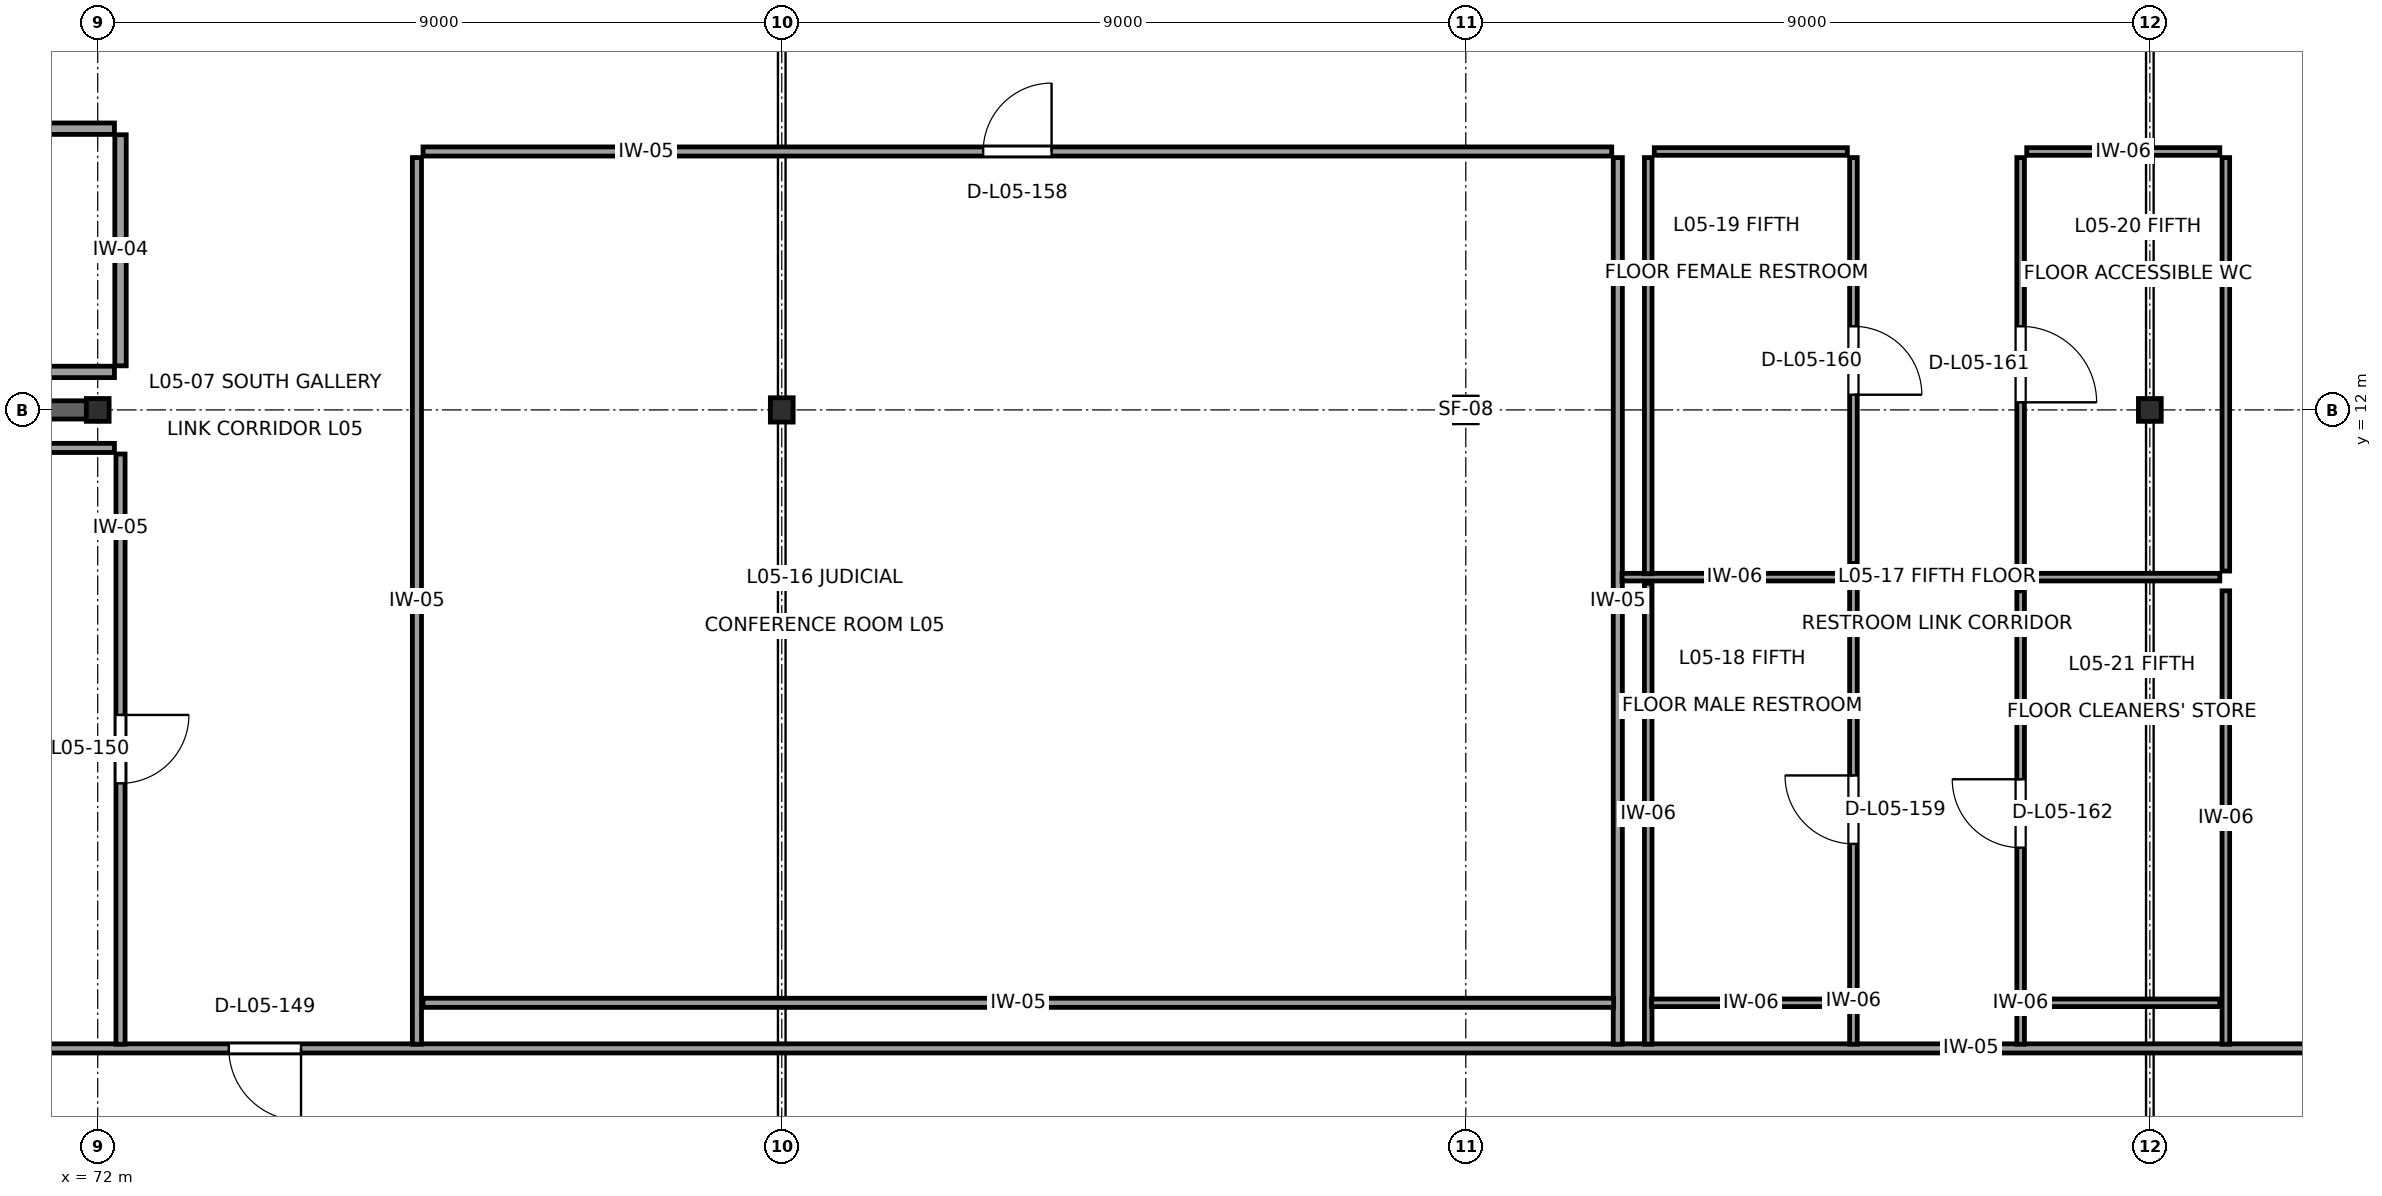
"""IFC4 building model, lengths in metres.
Left out: names, types, materials, properties, quantities, classifications, styles, units other than length and angle.
Written with IfcOpenShell. Run it as: python <this file> out.ifc"""

import sys

from ifc_helpers import new_model, si_unit, direction, frame, frame_2d, origin, origin_2d, place, context, subcontext, project, spatial, rectangle, i_section, extrude, element, fill, save


model = new_model("IFC4")
c1 = context("Model", 3, precision=1e-05, world=origin(), true_north=direction((0.0, 1.0)))
c2 = subcontext(c1, "Body", "Model", "MODEL_VIEW")
j1 = project(units=[si_unit("LENGTHUNIT", "METRE"), si_unit("PLANEANGLEUNIT", "RADIAN")], contexts=[c1])
p1 = place(None, origin())
s1 = spatial("IfcSite", under=j1, at=p1, CompositionType="ELEMENT")
p2 = place(p1, origin())
s2 = spatial("IfcBuilding", under=s1, at=p2, CompositionType="ELEMENT")
p3 = place(p2, frame((0.0, 0.0, 23.4)))
s3 = spatial("IfcBuildingStorey", under=s2, at=p3, CompositionType="ELEMENT", Elevation=23.4)
p4 = place(p3, frame((72.0, 12.0, 0.0), z_axis=(0.0, 0.0, 1.0), x_axis=(0.0, 1.0, 0.0)))
e1 = element("IfcColumn", 1, at=p4, inside=s3, PredefinedType="COLUMN", context=c2, shape_type="SweptSolid", body=[
    extrude(i_section(OverallWidth=0.3, OverallDepth=0.3, WebThickness=0.011, FlangeThickness=0.019, at=origin_2d()), origin(), (0.0, 0.0, 1.0), 4.0),
])
p5 = place(p3, frame((81.0, 12.0, 0.0), z_axis=(0.0, 0.0, 1.0), x_axis=(1.0, 0.0, 0.0)))
e2 = element("IfcColumn", 2, at=p5, inside=s3, PredefinedType="COLUMN", context=c2, shape_type="SweptSolid", body=[
    extrude(i_section(OverallWidth=0.3, OverallDepth=0.32, WebThickness=0.011, FlangeThickness=0.021, at=origin_2d()), origin(), (0.0, 0.0, 1.0), 4.0),
])
p6 = place(p3, frame((90.0, 12.0, 0.0), z_axis=(0.0, 0.0, 1.0), x_axis=(1.0, 0.0, 0.0)))
e3 = element("IfcColumn", 3, at=p6, inside=s3, PredefinedType="COLUMN", context=c2, shape_type="SweptSolid", body=[
    extrude(i_section(OverallWidth=0.3, OverallDepth=0.34, WebThickness=0.012, FlangeThickness=0.021, at=origin_2d()), origin(), (0.0, 0.0, 1.0), 4.0),
])
p7 = place(p3, frame((99.0, 12.0, 0.0), z_axis=(0.0, 0.0, 1.0), x_axis=(1.0, 0.0, 0.0)))
e4 = element("IfcColumn", 4, at=p7, inside=s3, PredefinedType="COLUMN", context=c2, shape_type="SweptSolid", body=[
    extrude(i_section(OverallWidth=0.3, OverallDepth=0.3, WebThickness=0.011, FlangeThickness=0.019, at=origin_2d()), origin(), (0.0, 0.0, 1.0), 4.0),
])
p8 = place(p3, frame((63.008, 12.0, 0.0), z_axis=(0.0, 0.0, 1.0), x_axis=(1.0, 0.0, 0.0)))
e5 = element("IfcWall", 5, at=p8, inside=s3, PredefinedType="SHEAR", context=c2, shape_type="SweptSolid", body=[
    extrude(rectangle(XDim=8.844, YDim=0.24, at=frame_2d((4.422, 0.0))), origin(), (0.0, 0.0, 1.0), 2.845),
])
p9 = place(p3, frame((53.87, 3.6, 0.0), z_axis=(0.0, 0.0, 1.0), x_axis=(1.0, 0.0, 0.0)))
e6 = element("IfcWall", 6, at=p9, inside=s3, PredefinedType="PARTITIONING", context=c2, shape_type="SweptSolid", body=[
    extrude(rectangle(XDim=63.25, YDim=0.12, at=frame_2d((31.625, 0.0))), origin(), (0.0, 0.0, 1.0), 3.64),
])
p10 = place(p9, frame((19.855, 0.0, 0.0)))
e7 = element("IfcOpeningElement", 7, at=p10, cuts=e6, PredefinedType="OPENING", context=c2, shape_type="SweptSolid", body=[
    extrude(rectangle(XDim=0.95, YDim=2.15, at=frame_2d((0.475, 1.075))), frame((0.0, 0.075, 0.0), z_axis=(0.0, -1.0, 0.0), x_axis=(1.0, 0.0, 0.0)), (0.0, 0.0, 1.0), 0.15),
])
p11 = place(p3, frame((72.3, 11.42, 0.0), z_axis=(0.0, 0.0, 1.0), x_axis=(0.0, -1.0, 0.0)))
e8 = element("IfcWall", 8, at=p11, inside=s3, PredefinedType="PARTITIONING", context=c2, shape_type="SweptSolid", body=[
    extrude(rectangle(XDim=7.765, YDim=0.12, at=frame_2d((3.882, 0.0))), origin(), (0.0, 0.0, 1.0), 3.64),
])
p12 = place(p11, frame((3.433, 0.0, 0.0)))
e9 = element("IfcOpeningElement", 9, at=p12, cuts=e8, PredefinedType="OPENING", context=c2, shape_type="SweptSolid", body=[
    extrude(rectangle(XDim=0.9, YDim=2.1, at=frame_2d((0.45, 1.05))), frame((0.0, 0.075, 0.0), z_axis=(0.0, -1.0, 0.0), x_axis=(1.0, 0.0, 0.0)), (0.0, 0.0, 1.0), 0.15),
])
p13 = place(p3, frame((62.795, 11.5, 0.0), z_axis=(0.0, 0.0, 1.0), x_axis=(1.0, 0.0, 0.0)))
e10 = element("IfcWall", 10, at=p13, inside=s3, PredefinedType="PARTITIONING", context=c2, shape_type="SweptSolid", body=[
    extrude(rectangle(XDim=9.425, YDim=0.12, at=frame_2d((4.712, 0.0))), origin(), (0.0, 0.0, 1.0), 3.64),
])
p14 = place(p3, frame((72.22, 12.5, 0.0), z_axis=(0.0, 0.0, 1.0), x_axis=(-1.0, 0.0, 0.0)))
e11 = element("IfcWall", 11, at=p14, inside=s3, PredefinedType="PARTITIONING", context=c2, shape_type="SweptSolid", body=[
    extrude(rectangle(XDim=9.425, YDim=0.15, at=frame_2d((4.712, 0.0))), origin(), (0.0, 0.0, 1.0), 3.64),
])
p15 = place(p3, frame((62.795, 15.7, 0.0), z_axis=(0.0, 0.0, 1.0), x_axis=(1.0, 0.0, 0.0)))
e12 = element("IfcWall", 12, at=p15, inside=s3, PredefinedType="PARTITIONING", context=c2, shape_type="SweptSolid", body=[
    extrude(rectangle(XDim=9.425, YDim=0.15, at=frame_2d((4.712, 0.0))), origin(), (0.0, 0.0, 1.0), 3.64),
])
p16 = place(p15, frame((4.187, 0.0, 0.0)))
e13 = element("IfcOpeningElement", 13, at=p16, cuts=e12, PredefinedType="OPENING", context=c2, shape_type="SweptSolid", body=[
    extrude(rectangle(XDim=1.05, YDim=2.25, at=frame_2d((0.525, 1.125))), frame((0.0, 0.09, 0.0), z_axis=(0.0, -1.0, 0.0), x_axis=(1.0, 0.0, 0.0)), (0.0, 0.0, 1.0), 0.18),
])
p17 = place(p3, frame((72.3, 15.62, 0.0), z_axis=(0.0, 0.0, 1.0), x_axis=(0.0, -1.0, 0.0)))
e14 = element("IfcWall", 14, at=p17, inside=s3, PredefinedType="PARTITIONING", context=c2, shape_type="SweptSolid", body=[
    extrude(rectangle(XDim=3.04, YDim=0.15, at=frame_2d((1.52, 0.0))), origin(), (0.0, 0.0, 1.0), 3.64),
])
p18 = place(p3, frame((92.0, 15.32, 0.0), z_axis=(0.0, 0.0, 1.0), x_axis=(0.0, -1.0, 0.0)))
e15 = element("IfcWall", 15, at=p18, inside=s3, PredefinedType="PARTITIONING", context=c2, shape_type="SweptSolid", body=[
    extrude(rectangle(XDim=11.665, YDim=0.12, at=frame_2d((5.833, 0.0))), origin(), (0.0, 0.0, 1.0), 3.64),
])
p19 = place(p3, frame((91.945, 4.2, 0.0), z_axis=(0.0, 0.0, 1.0), x_axis=(-1.0, 0.0, 0.0)))
e16 = element("IfcWall", 16, at=p19, inside=s3, PredefinedType="PARTITIONING", context=c2, shape_type="SweptSolid", body=[
    extrude(rectangle(XDim=15.665, YDim=0.12, at=frame_2d((7.833, 0.0))), origin(), (0.0, 0.0, 1.0), 3.64),
])
p20 = place(p3, frame((76.2, 3.655, 0.0), z_axis=(0.0, 0.0, 1.0), x_axis=(0.0, 1.0, 0.0)))
e17 = element("IfcWall", 17, at=p20, inside=s3, PredefinedType="PARTITIONING", context=c2, shape_type="SweptSolid", body=[
    extrude(rectangle(XDim=11.665, YDim=0.12, at=frame_2d((5.833, 0.0))), origin(), (0.0, 0.0, 1.0), 3.64),
])
p21 = place(p3, frame((76.28, 15.4, 0.0), z_axis=(0.0, 0.0, 1.0), x_axis=(1.0, 0.0, 0.0)))
e18 = element("IfcWall", 18, at=p21, inside=s3, PredefinedType="PARTITIONING", context=c2, shape_type="SweptSolid", body=[
    extrude(rectangle(XDim=15.64, YDim=0.12, at=frame_2d((7.82, 0.0))), origin(), (0.0, 0.0, 1.0), 3.64),
])
p22 = place(p21, frame((7.37, 0.0, 0.0)))
e19 = element("IfcOpeningElement", 19, at=p22, cuts=e18, PredefinedType="OPENING", context=c2, shape_type="SweptSolid", body=[
    extrude(rectangle(XDim=0.9, YDim=2.1, at=frame_2d((0.45, 1.05))), frame((0.0, 0.075, 0.0), z_axis=(0.0, -1.0, 0.0), x_axis=(1.0, 0.0, 0.0)), (0.0, 0.0, 1.0), 0.15),
])
p23 = place(p3, frame((92.4, 3.655, 0.0), z_axis=(0.0, 0.0, 1.0), x_axis=(0.0, 1.0, 0.0)))
e20 = element("IfcWall", 20, at=p23, inside=s3, PredefinedType="PARTITIONING", context=c2, shape_type="SweptSolid", body=[
    extrude(rectangle(XDim=6.065, YDim=0.1, at=frame_2d((3.032, 0.0))), origin(), (0.0, 0.0, 1.0), 3.64),
])
p24 = place(p3, frame((92.055, 9.8, 0.0), z_axis=(0.0, 0.0, 1.0), x_axis=(1.0, 0.0, 0.0)))
e21 = element("IfcWall", 21, at=p24, inside=s3, PredefinedType="PARTITIONING", context=c2, shape_type="SweptSolid", body=[
    extrude(rectangle(XDim=2.965, YDim=0.1, at=frame_2d((1.482, 0.0))), origin(), (0.0, 0.0, 1.0), 3.64),
])
p25 = place(p3, frame((95.1, 9.72, 0.0), z_axis=(0.0, 0.0, 1.0), x_axis=(0.0, -1.0, 0.0)))
e22 = element("IfcWall", 22, at=p25, inside=s3, PredefinedType="PARTITIONING", context=c2, shape_type="SweptSolid", body=[
    extrude(rectangle(XDim=6.065, YDim=0.1, at=frame_2d((3.032, 0.0))), origin(), (0.0, 0.0, 1.0), 3.64),
])
p26 = place(p25, frame((2.529, 0.0, 0.0)))
e23 = element("IfcOpeningElement", 23, at=p26, cuts=e22, PredefinedType="OPENING", context=c2, shape_type="SweptSolid", body=[
    extrude(rectangle(XDim=0.9, YDim=2.05, at=frame_2d((0.45, 1.025))), frame((0.0, 0.065, 0.0), z_axis=(0.0, -1.0, 0.0), x_axis=(1.0, 0.0, 0.0)), (0.0, 0.0, 1.0), 0.13),
])
p27 = place(p3, frame((95.055, 4.2, 0.0), z_axis=(0.0, 0.0, 1.0), x_axis=(-1.0, 0.0, 0.0)))
e24 = element("IfcWall", 24, at=p27, inside=s3, PredefinedType="PARTITIONING", context=c2, shape_type="SweptSolid", body=[
    extrude(rectangle(XDim=2.61, YDim=0.1, at=frame_2d((1.305, 0.0))), origin(), (0.0, 0.0, 1.0), 3.64),
])
p28 = place(p3, frame((92.48, 15.4, 0.0), z_axis=(0.0, 0.0, 1.0), x_axis=(1.0, 0.0, 0.0)))
e25 = element("IfcWall", 25, at=p28, inside=s3, PredefinedType="PARTITIONING", context=c2, shape_type="SweptSolid", body=[
    extrude(rectangle(XDim=2.54, YDim=0.1, at=frame_2d((1.27, 0.0))), origin(), (0.0, 0.0, 1.0), 3.64),
])
p29 = place(p3, frame((95.1, 15.32, 0.0), z_axis=(0.0, 0.0, 1.0), x_axis=(0.0, -1.0, 0.0)))
e26 = element("IfcWall", 26, at=p29, inside=s3, PredefinedType="PARTITIONING", context=c2, shape_type="SweptSolid", body=[
    extrude(rectangle(XDim=5.34, YDim=0.1, at=frame_2d((2.67, 0.0))), origin(), (0.0, 0.0, 1.0), 3.64),
])
p30 = place(p29, frame((2.22, 0.0, 0.0)))
e27 = element("IfcOpeningElement", 27, at=p30, cuts=e26, PredefinedType="OPENING", context=c2, shape_type="SweptSolid", body=[
    extrude(rectangle(XDim=0.9, YDim=2.05, at=frame_2d((0.45, 1.025))), frame((0.0, 0.065, 0.0), z_axis=(0.0, -1.0, 0.0), x_axis=(1.0, 0.0, 0.0)), (0.0, 0.0, 1.0), 0.13),
])
p31 = place(p3, frame((92.4, 9.845, 0.0), z_axis=(0.0, 0.0, 1.0), x_axis=(0.0, 1.0, 0.0)))
e28 = element("IfcWall", 28, at=p31, inside=s3, PredefinedType="PARTITIONING", context=c2, shape_type="SweptSolid", body=[
    extrude(rectangle(XDim=5.475, YDim=0.1, at=frame_2d((2.738, 0.0))), origin(), (0.0, 0.0, 1.0), 3.64),
])
p32 = place(p3, frame((100.0, 15.32, 0.0), z_axis=(0.0, 0.0, 1.0), x_axis=(0.0, -1.0, 0.0)))
e29 = element("IfcWall", 29, at=p32, inside=s3, PredefinedType="PARTITIONING", context=c2, shape_type="SweptSolid", body=[
    extrude(rectangle(XDim=5.44, YDim=0.1, at=frame_2d((2.72, 0.0))), origin(), (0.0, 0.0, 1.0), 3.64),
])
p33 = place(p3, frame((99.92, 9.8, 0.0), z_axis=(0.0, 0.0, 1.0), x_axis=(-1.0, 0.0, 0.0)))
e30 = element("IfcWall", 30, at=p33, inside=s3, PredefinedType="PARTITIONING", context=c2, shape_type="SweptSolid", body=[
    extrude(rectangle(XDim=2.54, YDim=0.1, at=frame_2d((1.27, 0.0))), origin(), (0.0, 0.0, 1.0), 3.64),
])
p34 = place(p3, frame((97.3, 9.88, 0.0), z_axis=(0.0, 0.0, 1.0), x_axis=(0.0, 1.0, 0.0)))
e31 = element("IfcWall", 31, at=p34, inside=s3, PredefinedType="PARTITIONING", context=c2, shape_type="SweptSolid", body=[
    extrude(rectangle(XDim=5.44, YDim=0.1, at=frame_2d((2.72, 0.0))), origin(), (0.0, 0.0, 1.0), 3.64),
])
p35 = place(p34, frame((2.22, 0.0, 0.0)))
e32 = element("IfcOpeningElement", 32, at=p35, cuts=e31, PredefinedType="OPENING", context=c2, shape_type="SweptSolid", body=[
    extrude(rectangle(XDim=1.0, YDim=2.1, at=frame_2d((0.5, 1.05))), frame((0.0, 0.065, 0.0), z_axis=(0.0, -1.0, 0.0), x_axis=(1.0, 0.0, 0.0)), (0.0, 0.0, 1.0), 0.13),
])
for number, where, z_axis, x_axis in (
    (33, (97.38, 15.4, 0.0), (0.0, 0.0, 1.0), (1.0, 0.0, 0.0)),
    (34, (99.92, 4.2, 0.0), (0.0, 0.0, 1.0), (-1.0, 0.0, 0.0)),
):
    element("IfcWall", number, at=place(p3, frame(where, z_axis=z_axis, x_axis=x_axis)), inside=s3, PredefinedType="PARTITIONING", context=c2, shape_type="SweptSolid", body=[
        extrude(rectangle(XDim=2.54, YDim=0.1, at=frame_2d((1.27, 0.0))), origin(), (0.0, 0.0, 1.0), 3.64),
    ])
p36 = place(p3, frame((97.3, 3.655, 0.0), z_axis=(0.0, 0.0, 1.0), x_axis=(0.0, 1.0, 0.0)))
e35 = element("IfcWall", 35, at=p36, inside=s3, PredefinedType="PARTITIONING", context=c2, shape_type="SweptSolid", body=[
    extrude(rectangle(XDim=5.965, YDim=0.1, at=frame_2d((2.982, 0.0))), origin(), (0.0, 0.0, 1.0), 3.64),
])
p37 = place(p36, frame((2.586, 0.0, 0.0)))
e36 = element("IfcOpeningElement", 36, at=p37, cuts=e35, PredefinedType="OPENING", context=c2, shape_type="SweptSolid", body=[
    extrude(rectangle(XDim=0.9, YDim=2.05, at=frame_2d((0.45, 1.025))), frame((0.0, 0.065, 0.0), z_axis=(0.0, -1.0, 0.0), x_axis=(1.0, 0.0, 0.0)), (0.0, 0.0, 1.0), 0.13),
])
p38 = place(p3, frame((100.0, 9.62, 0.0), z_axis=(0.0, 0.0, 1.0), x_axis=(0.0, -1.0, 0.0)))
e37 = element("IfcWall", 37, at=p38, inside=s3, PredefinedType="PARTITIONING", context=c2, shape_type="SweptSolid", body=[
    extrude(rectangle(XDim=5.965, YDim=0.1, at=frame_2d((2.982, 0.0))), origin(), (0.0, 0.0, 1.0), 3.64),
])
p39 = place(p10, frame((0.95, 0.0, 0.0), z_axis=(0.0, 0.0, 1.0), x_axis=(-1.0, 0.0, 0.0)))
e38 = element("IfcDoor", 38, at=p39, inside=s3, OperationType="SINGLE_SWING_RIGHT", PredefinedType="DOOR", context=c2, shape_type="SweptSolid", body=[
    extrude(rectangle(XDim=0.95, YDim=2.15, at=frame_2d((0.475, 1.075))), frame((0.0, 0.025, 0.0), z_axis=(0.0, -1.0, 0.0), x_axis=(1.0, 0.0, 0.0)), (0.0, 0.0, 1.0), 0.05),
])
fill(e7, e38)
p40 = place(p12, origin())
e39 = element("IfcDoor", 39, at=p40, inside=s3, OperationType="SINGLE_SWING_LEFT", PredefinedType="DOOR", context=c2, shape_type="SweptSolid", body=[
    extrude(rectangle(XDim=0.9, YDim=2.1, at=frame_2d((0.45, 1.05))), frame((0.0, 0.025, 0.0), z_axis=(0.0, -1.0, 0.0), x_axis=(1.0, 0.0, 0.0)), (0.0, 0.0, 1.0), 0.05),
])
fill(e9, e39)
p41 = place(p22, origin())
e40 = element("IfcDoor", 40, at=p41, inside=s3, OperationType="SINGLE_SWING_RIGHT", PredefinedType="DOOR", context=c2, shape_type="SweptSolid", body=[
    extrude(rectangle(XDim=0.9, YDim=2.1, at=frame_2d((0.45, 1.05))), frame((0.0, 0.025, 0.0), z_axis=(0.0, -1.0, 0.0), x_axis=(1.0, 0.0, 0.0)), (0.0, 0.0, 1.0), 0.05),
])
fill(e19, e40)
p42 = place(p26, frame((0.9, 0.0, 0.0), z_axis=(0.0, 0.0, 1.0), x_axis=(-1.0, 0.0, 0.0)))
e41 = element("IfcDoor", 41, at=p42, inside=s3, OperationType="SINGLE_SWING_LEFT", PredefinedType="DOOR", context=c2, shape_type="SweptSolid", body=[
    extrude(rectangle(XDim=0.9, YDim=2.05, at=frame_2d((0.45, 1.025))), frame((0.0, 0.025, 0.0), z_axis=(0.0, -1.0, 0.0), x_axis=(1.0, 0.0, 0.0)), (0.0, 0.0, 1.0), 0.05),
])
fill(e23, e41)
p43 = place(p30, origin())
e42 = element("IfcDoor", 42, at=p43, inside=s3, OperationType="SINGLE_SWING_RIGHT", PredefinedType="DOOR", context=c2, shape_type="SweptSolid", body=[
    extrude(rectangle(XDim=0.9, YDim=2.05, at=frame_2d((0.45, 1.025))), frame((0.0, 0.025, 0.0), z_axis=(0.0, -1.0, 0.0), x_axis=(1.0, 0.0, 0.0)), (0.0, 0.0, 1.0), 0.05),
])
fill(e27, e42)
p44 = place(p35, frame((1.0, 0.0, 0.0), z_axis=(0.0, 0.0, 1.0), x_axis=(-1.0, 0.0, 0.0)))
e43 = element("IfcDoor", 43, at=p44, inside=s3, OperationType="SINGLE_SWING_LEFT", PredefinedType="DOOR", context=c2, shape_type="SweptSolid", body=[
    extrude(rectangle(XDim=1.0, YDim=2.1, at=frame_2d((0.5, 1.05))), frame((0.0, 0.025, 0.0), z_axis=(0.0, -1.0, 0.0), x_axis=(1.0, 0.0, 0.0)), (0.0, 0.0, 1.0), 0.05),
])
fill(e32, e43)
p45 = place(p37, origin())
e44 = element("IfcDoor", 44, at=p45, inside=s3, OperationType="SINGLE_SWING_RIGHT", PredefinedType="DOOR", context=c2, shape_type="SweptSolid", body=[
    extrude(rectangle(XDim=0.9, YDim=2.05, at=frame_2d((0.45, 1.025))), frame((0.0, 0.025, 0.0), z_axis=(0.0, -1.0, 0.0), x_axis=(1.0, 0.0, 0.0)), (0.0, 0.0, 1.0), 0.05),
])
fill(e36, e44)
save(model, sys.argv[1])
